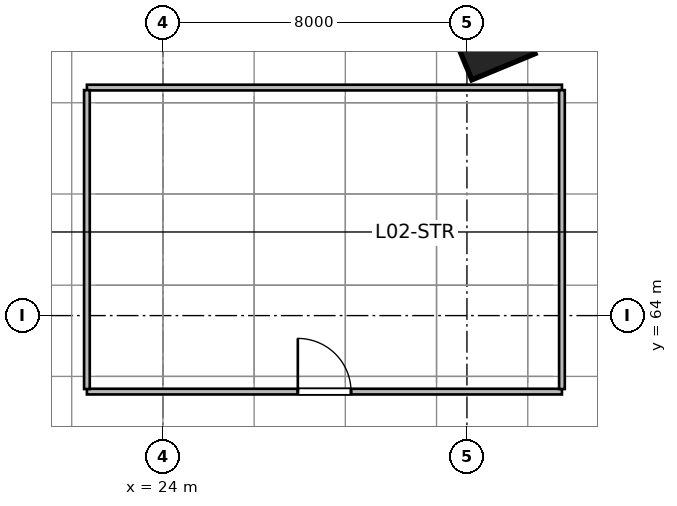
"""IFC4 building model, lengths in metres.
Left out: names, types, materials, properties, quantities, classifications, styles, units other than length and angle.
Written with IfcOpenShell. Run it as: python <this file> out.ifc"""

import sys

from ifc_helpers import new_model, si_unit, direction, frame, frame_2d, origin, origin_2d, place, context, subcontext, project, spatial, rectangle, extrude, source, transform, mapped, element, fill, save


model = new_model("IFC4")
c1 = context("Model", 3, precision=1e-05, world=origin(), true_north=direction((0.0, 1.0)))
c2 = subcontext(c1, "Body", "Model", "MODEL_VIEW")
j1 = project(units=[si_unit("LENGTHUNIT", "METRE"), si_unit("PLANEANGLEUNIT", "RADIAN")], contexts=[c1])
p1 = place(None, origin())
s1 = spatial("IfcSite", under=j1, at=p1, CompositionType="ELEMENT")
p2 = place(p1, origin())
s2 = spatial("IfcBuilding", under=s1, at=p2, CompositionType="ELEMENT")
p3 = place(p2, frame((0.0, 0.0, 12.0)))
s3 = spatial("IfcBuildingStorey", under=s2, at=p3, CompositionType="ELEMENT", Elevation=12.0)
m1 = source(origin(), c2, "Body", "SweptSolid", [
    extrude(rectangle(XDim=1.8, YDim=1.8, at=origin_2d()), origin(), (0.0, 0.0, 1.0), 6.0),
])
p4 = place(p3, frame((32.616, 71.379, 0.0), z_axis=(0.0, 0.0, 1.0), x_axis=(-0.382683432365, 0.923879532511, 0.0)))
e1 = element("IfcColumn", 1, at=p4, inside=s3, PredefinedType="COLUMN", context=c2, shape_type="MappedRepresentation", body=[
    mapped(m1, transform((0.0, 0.0, 0.0), scale=1.0)),
])
m2 = source(origin(), c2, "Body", "SweptSolid", [
    extrude(rectangle(XDim=12.5, YDim=0.15, at=frame_2d((6.25, 0.0))), origin(), (0.0, 0.0, 1.0), 5.7),
])
p5 = place(p3, frame((22.0, 62.0, 0.0), z_axis=(0.0, 0.0, 1.0), x_axis=(1.0, 0.0, 0.0)))
e2 = element("IfcWall", 2, at=p5, inside=s3, PredefinedType="PARTITIONING", context=c2, shape_type="MappedRepresentation", body=[
    mapped(m2, transform((0.0, 0.0, 0.0), scale=1.0)),
])
p6 = place(p5, frame((5.55, 0.0, 0.0)))
e3 = element("IfcOpeningElement", 3, at=p6, cuts=e2, PredefinedType="OPENING", context=c2, shape_type="SweptSolid", body=[
    extrude(rectangle(XDim=1.4, YDim=2.15, at=frame_2d((0.7, 1.075))), frame((0.0, 0.085, 0.0), z_axis=(0.0, -1.0, 0.0), x_axis=(1.0, 0.0, 0.0)), (0.0, 0.0, 1.0), 0.17),
])
m3 = source(origin(), c2, "Body", "SweptSolid", [
    extrude(rectangle(XDim=12.5, YDim=0.15, at=frame_2d((6.25, 0.0))), origin(), (0.0, 0.0, 1.0), 4.761),
])
p7 = place(p3, frame((22.0, 70.0, 0.0), z_axis=(0.0, 0.0, 1.0), x_axis=(1.0, 0.0, 0.0)))
e4 = element("IfcWall", 4, at=p7, inside=s3, PredefinedType="PARTITIONING", context=c2, shape_type="MappedRepresentation", body=[
    mapped(m3, transform((0.0, 0.0, 0.0), scale=1.0)),
])
m4 = source(origin(), c2, "Body", "SweptSolid", [
    extrude(rectangle(XDim=7.865, YDim=0.15, at=frame_2d((3.933, 0.0))), origin(), (0.0, 0.0, 1.0), 5.7),
])
for number, where, z_axis, x_axis in (
    (5, (22.0, 62.067, 0.0), (0.0, 0.0, 1.0), (0.0, 1.0, 0.0)),
    (6, (34.5, 62.067, 0.0), (0.0, 0.0, 1.0), (0.0, 1.0, 0.0)),
):
    element("IfcWall", number, at=place(p3, frame(where, z_axis=z_axis, x_axis=x_axis)), inside=s3, PredefinedType="PARTITIONING", context=c2, shape_type="MappedRepresentation", body=[
        mapped(m4, transform((0.0, 0.0, 0.0), scale=1.0)),
    ])
m5 = source(origin(), c2, "Body", "SweptSolid", [
    extrude(rectangle(XDim=1.4, YDim=2.15, at=frame_2d((0.7, 1.075))), frame((0.0, 0.025, 0.0), z_axis=(0.0, -1.0, 0.0), x_axis=(1.0, 0.0, 0.0)), (0.0, 0.0, 1.0), 0.05),
])
p8 = place(p6, origin())
e7 = element("IfcDoor", 7, at=p8, inside=s3, OperationType="SINGLE_SWING_LEFT", PredefinedType="DOOR", context=c2, shape_type="MappedRepresentation", body=[
    mapped(m5, transform((0.0, 0.0, 0.0), scale=1.0)),
])
fill(e3, e7)
save(model, sys.argv[1])
